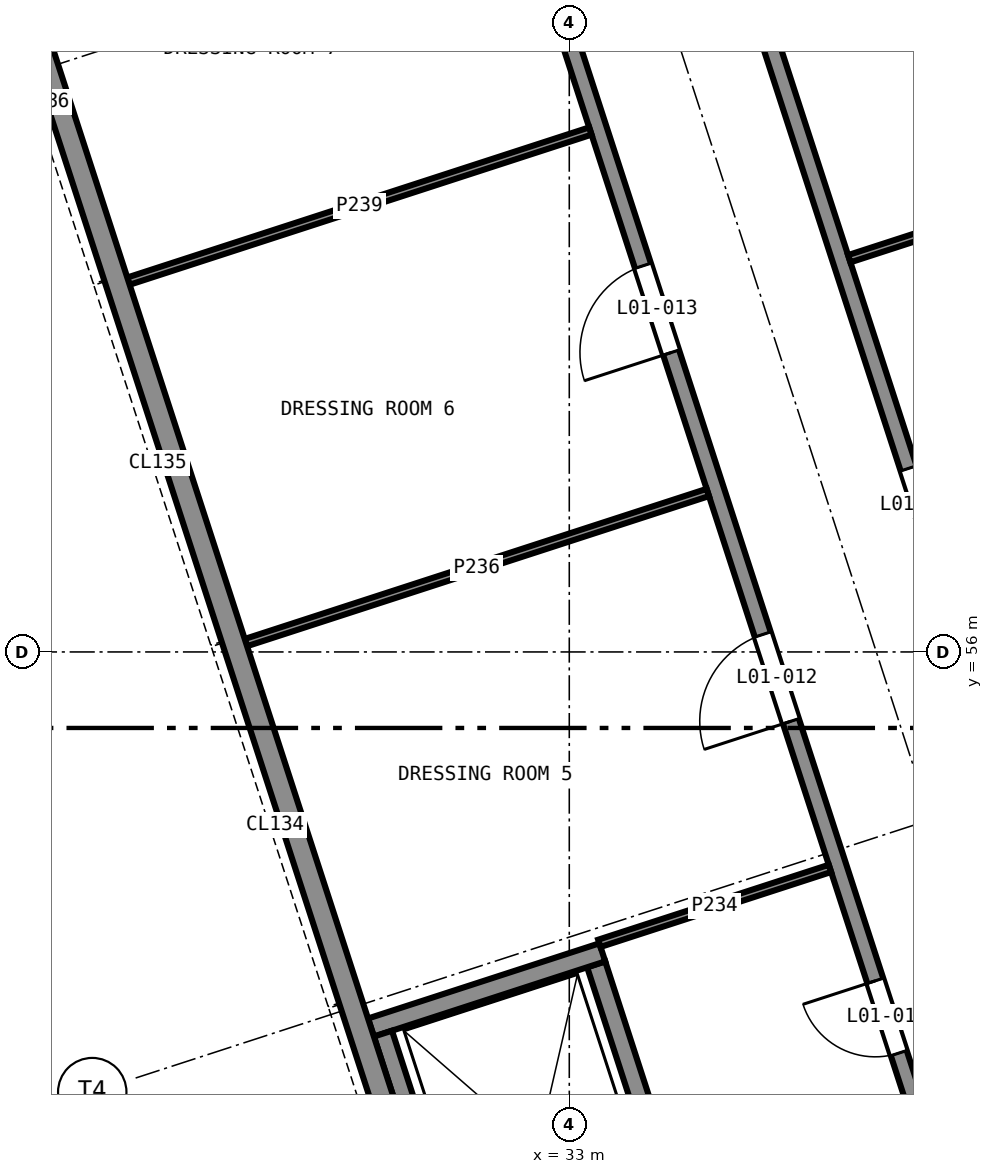
"""IFC4 building model, lengths in metres.
Left out: names, types, materials, properties, quantities, classifications, styles, units other than length and angle.
Written with IfcOpenShell. Run it as: python <this file> out.ifc"""

import sys

from ifc_helpers import new_model, si_unit, direction, frame, frame_2d, origin, place, context, subcontext, project, spatial, rectangle, extrude, element, fill, save


model = new_model("IFC4")
c1 = context("Model", 3, precision=1e-05, world=origin(), true_north=direction((0.0, 1.0)))
c2 = subcontext(c1, "Body", "Model", "MODEL_VIEW")
j1 = project(units=[si_unit("LENGTHUNIT", "METRE"), si_unit("PLANEANGLEUNIT", "RADIAN")], contexts=[c1])
p1 = place(None, origin())
s1 = spatial("IfcSite", under=j1, at=p1, CompositionType="ELEMENT")
p2 = place(p1, origin())
s2 = spatial("IfcBuilding", under=s1, at=p2, CompositionType="ELEMENT")
p3 = place(p2, frame((0.0, 0.0, 5.5)))
s3 = spatial("IfcBuildingStorey", under=s2, at=p3, CompositionType="ELEMENT", Elevation=5.5)
p4 = place(p3, frame((33.501, 41.003, 0.0), z_axis=(0.0, 0.0, 1.0), x_axis=(-0.309017194826, 0.951056451165, 0.0)))
e1 = element("IfcWall", 1, at=p4, inside=s3, PredefinedType="SOLIDWALL", context=c2, shape_type="SweptSolid", body=[
    extrude(rectangle(XDim=53.7, YDim=0.3, at=frame_2d((26.85, 0.0))), origin(), (0.0, 0.0, 1.0), 4.0),
])
p5 = place(p4, frame((26.55, 0.0, 0.9)))
e2 = element("IfcOpeningElement", 2, at=p5, cuts=e1, PredefinedType="OPENING", context=c2, shape_type="SweptSolid", body=[
    extrude(rectangle(XDim=3.6, YDim=2.1, at=frame_2d((1.8, 1.05))), frame((0.0, 0.16, 0.0), z_axis=(0.0, -1.0, 0.0), x_axis=(1.0, 0.0, 0.0)), (0.0, 0.0, 1.0), 0.32),
])
p6 = place(p3, frame((34.621, 47.991, 0.0), z_axis=(0.0, 0.0, 1.0), x_axis=(-0.309055103076, 0.951044133184, 0.0)))
e3 = element("IfcWall", 3, at=p6, inside=s3, PredefinedType="SHEAR", context=c2, shape_type="SweptSolid", body=[
    extrude(rectangle(XDim=4.1, YDim=0.25, at=frame_2d((2.05, 0.0))), origin(), (0.0, 0.0, 1.0), 4.0),
])
p7 = place(p3, frame((33.434, 52.048, 0.0), z_axis=(0.0, 0.0, 1.0), x_axis=(-0.951066581729, -0.308986014439, 0.0)))
e4 = element("IfcWall", 4, at=p7, inside=s3, PredefinedType="SHEAR", context=c2, shape_type="SweptSolid", body=[
    extrude(rectangle(XDim=3.2, YDim=0.25, at=frame_2d((1.6, 0.0))), origin(), (0.0, 0.0, 1.0), 4.0),
])
p8 = place(p3, frame((30.548, 50.979, 0.0), z_axis=(0.0, 0.0, 1.0), x_axis=(0.309055103076, -0.951044133184, 0.0)))
e5 = element("IfcWall", 5, at=p8, inside=s3, PredefinedType="SHEAR", context=c2, shape_type="SweptSolid", body=[
    extrude(rectangle(XDim=4.1, YDim=0.25, at=frame_2d((2.05, 0.0))), origin(), (0.0, 0.0, 1.0), 4.0),
])
p9 = place(p3, frame((37.956, 48.812, 0.0), z_axis=(0.0, 0.0, 1.0), x_axis=(-0.30901736393, 0.951056396219, 0.0)))
e6 = element("IfcWall", 6, at=p9, inside=s3, PredefinedType="SOLIDWALL", context=c2, shape_type="SweptSolid", body=[
    extrude(rectangle(XDim=41.7, YDim=0.22, at=frame_2d((20.85, 0.0))), origin(), (0.0, 0.0, 1.0), 3.7),
])
p10 = place(p9, frame((2.009, 0.0, 0.0)))
e7 = element("IfcOpeningElement", 7, at=p10, cuts=e6, PredefinedType="OPENING", context=c2, shape_type="SweptSolid", body=[
    extrude(rectangle(XDim=1.0, YDim=2.1, at=frame_2d((0.5, 1.05))), frame((0.0, 0.12, 0.0), z_axis=(0.0, -1.0, 0.0), x_axis=(1.0, 0.0, 0.0)), (0.0, 0.0, 1.0), 0.24),
])
p11 = place(p9, frame((6.6, 0.0, 0.0)))
e8 = element("IfcOpeningElement", 8, at=p11, cuts=e6, PredefinedType="OPENING", context=c2, shape_type="SweptSolid", body=[
    extrude(rectangle(XDim=1.2, YDim=2.1, at=frame_2d((0.6, 1.05))), frame((0.0, 0.12, 0.0), z_axis=(0.0, -1.0, 0.0), x_axis=(1.0, 0.0, 0.0)), (0.0, 0.0, 1.0), 0.24),
])
p12 = place(p9, frame((11.7, 0.0, 0.0)))
e9 = element("IfcOpeningElement", 9, at=p12, cuts=e6, PredefinedType="OPENING", context=c2, shape_type="SweptSolid", body=[
    extrude(rectangle(XDim=1.2, YDim=2.1, at=frame_2d((0.6, 1.05))), frame((0.0, 0.12, 0.0), z_axis=(0.0, -1.0, 0.0), x_axis=(1.0, 0.0, 0.0)), (0.0, 0.0, 1.0), 0.24),
])
p13 = place(p9, frame((16.7, 0.0, 0.0)))
e10 = element("IfcOpeningElement", 10, at=p13, cuts=e6, PredefinedType="OPENING", context=c2, shape_type="SweptSolid", body=[
    extrude(rectangle(XDim=1.2, YDim=2.1, at=frame_2d((0.6, 1.05))), frame((0.0, 0.12, 0.0), z_axis=(0.0, -1.0, 0.0), x_axis=(1.0, 0.0, 0.0)), (0.0, 0.0, 1.0), 0.24),
])
p14 = place(p9, frame((21.7, 0.0, 0.0)))
e11 = element("IfcOpeningElement", 11, at=p14, cuts=e6, PredefinedType="OPENING", context=c2, shape_type="SweptSolid", body=[
    extrude(rectangle(XDim=1.2, YDim=2.1, at=frame_2d((0.6, 1.05))), frame((0.0, 0.12, 0.0), z_axis=(0.0, -1.0, 0.0), x_axis=(1.0, 0.0, 0.0)), (0.0, 0.0, 1.0), 0.24),
])
p15 = place(p9, frame((26.7, 0.0, 0.0)))
e12 = element("IfcOpeningElement", 12, at=p15, cuts=e6, PredefinedType="OPENING", context=c2, shape_type="SweptSolid", body=[
    extrude(rectangle(XDim=1.2, YDim=2.1, at=frame_2d((0.6, 1.05))), frame((0.0, 0.12, 0.0), z_axis=(0.0, -1.0, 0.0), x_axis=(1.0, 0.0, 0.0)), (0.0, 0.0, 1.0), 0.24),
])
p16 = place(p9, frame((31.739, 0.0, 0.0)))
e13 = element("IfcOpeningElement", 13, at=p16, cuts=e6, PredefinedType="OPENING", context=c2, shape_type="SweptSolid", body=[
    extrude(rectangle(XDim=1.2, YDim=2.1, at=frame_2d((0.6, 1.05))), frame((0.0, 0.12, 0.0), z_axis=(0.0, -1.0, 0.0), x_axis=(1.0, 0.0, 0.0)), (0.0, 0.0, 1.0), 0.24),
])
p17 = place(p3, frame((40.333, 49.584, 0.0), z_axis=(0.0, 0.0, 1.0), x_axis=(-0.309015643281, 0.951056955291, 0.0)))
e14 = element("IfcWall", 14, at=p17, inside=s3, PredefinedType="SOLIDWALL", context=c2, shape_type="SweptSolid", body=[
    extrude(rectangle(XDim=41.7, YDim=0.22, at=frame_2d((20.85, 0.0))), origin(), (0.0, 0.0, 1.0), 3.7),
])
p18 = place(p17, frame((1.9, 0.0, 0.0)))
e15 = element("IfcOpeningElement", 15, at=p18, cuts=e14, PredefinedType="OPENING", context=c2, shape_type="SweptSolid", body=[
    extrude(rectangle(XDim=1.2, YDim=2.1, at=frame_2d((0.6, 1.05))), frame((0.0, 0.12, 0.0), z_axis=(0.0, -1.0, 0.0), x_axis=(1.0, 0.0, 0.0)), (0.0, 0.0, 1.0), 0.24),
])
p19 = place(p17, frame((8.285, 0.0, 0.0)))
e16 = element("IfcOpeningElement", 16, at=p19, cuts=e14, PredefinedType="OPENING", context=c2, shape_type="SweptSolid", body=[
    extrude(rectangle(XDim=1.0, YDim=2.1, at=frame_2d((0.5, 1.05))), frame((0.0, 0.12, 0.0), z_axis=(0.0, -1.0, 0.0), x_axis=(1.0, 0.0, 0.0)), (0.0, 0.0, 1.0), 0.24),
])
p20 = place(p17, frame((16.375, 0.0, 0.0)))
e17 = element("IfcOpeningElement", 17, at=p20, cuts=e14, PredefinedType="OPENING", context=c2, shape_type="SweptSolid", body=[
    extrude(rectangle(XDim=1.2, YDim=2.1, at=frame_2d((0.6, 1.05))), frame((0.0, 0.12, 0.0), z_axis=(0.0, -1.0, 0.0), x_axis=(1.0, 0.0, 0.0)), (0.0, 0.0, 1.0), 0.24),
])
p21 = place(p17, frame((25.752, 0.0, 0.0)))
e18 = element("IfcOpeningElement", 18, at=p21, cuts=e14, PredefinedType="OPENING", context=c2, shape_type="SweptSolid", body=[
    extrude(rectangle(XDim=1.0, YDim=2.1, at=frame_2d((0.5, 1.05))), frame((0.0, 0.12, 0.0), z_axis=(0.0, -1.0, 0.0), x_axis=(1.0, 0.0, 0.0)), (0.0, 0.0, 1.0), 0.24),
])
p22 = place(p17, frame((32.761, 0.0, 0.0)))
e19 = element("IfcOpeningElement", 19, at=p22, cuts=e14, PredefinedType="OPENING", context=c2, shape_type="SweptSolid", body=[
    extrude(rectangle(XDim=1.0, YDim=2.1, at=frame_2d((0.5, 1.05))), frame((0.0, 0.12, 0.0), z_axis=(0.0, -1.0, 0.0), x_axis=(1.0, 0.0, 0.0)), (0.0, 0.0, 1.0), 0.24),
])
p23 = place(p3, frame((33.396, 52.167, 0.0), z_axis=(0.0, 0.0, 1.0), x_axis=(0.951044192343, 0.309054921027, 0.0)))
e20 = element("IfcWall", 20, at=p23, inside=s3, PredefinedType="PARTITIONING", context=c2, shape_type="SweptSolid", body=[
    extrude(rectangle(XDim=3.19, YDim=0.1, at=frame_2d((1.595, 0.0))), origin(), (0.0, 0.0, 1.0), 3.7),
])
p24 = place(p3, frame((28.745, 56.123, 0.0), z_axis=(0.0, 0.0, 1.0), x_axis=(0.951059053869, 0.309009184417, 0.0)))
e21 = element("IfcWall", 21, at=p24, inside=s3, PredefinedType="PARTITIONING", context=c2, shape_type="SweptSolid", body=[
    extrude(rectangle(XDim=6.39, YDim=0.1, at=frame_2d((3.195, 0.0))), origin(), (0.0, 0.0, 1.0), 3.7),
])
p25 = place(p3, frame((36.683, 61.173, 0.0), z_axis=(0.0, 0.0, 1.0), x_axis=(0.95105616864, 0.309018064344, 0.0)))
e22 = element("IfcWall", 22, at=p25, inside=s3, PredefinedType="PARTITIONING", context=c2, shape_type="SweptSolid", body=[
    extrude(rectangle(XDim=4.14, YDim=0.1, at=frame_2d((2.07, 0.0))), origin(), (0.0, 0.0, 1.0), 3.7),
])
p26 = place(p3, frame((27.2, 60.878, 0.0), z_axis=(0.0, 0.0, 1.0), x_axis=(0.951055405517, 0.309020412977, 0.0)))
e23 = element("IfcWall", 23, at=p26, inside=s3, PredefinedType="PARTITIONING", context=c2, shape_type="SweptSolid", body=[
    extrude(rectangle(XDim=6.39, YDim=0.1, at=frame_2d((3.195, 0.0))), origin(), (0.0, 0.0, 1.0), 3.7),
])
p27 = place(p10, origin())
e24 = element("IfcDoor", 24, at=p27, inside=s3, OperationType="SINGLE_SWING_LEFT", PredefinedType="DOOR", context=c2, shape_type="SweptSolid", body=[
    extrude(rectangle(XDim=1.0, YDim=2.1, at=frame_2d((0.5, 1.05))), frame((0.0, 0.025, 0.0), z_axis=(0.0, -1.0, 0.0), x_axis=(1.0, 0.0, 0.0)), (0.0, 0.0, 1.0), 0.05),
])
fill(e7, e24)
p28 = place(p11, origin())
e25 = element("IfcDoor", 25, at=p28, inside=s3, OperationType="SINGLE_SWING_RIGHT", PredefinedType="DOOR", context=c2, shape_type="SweptSolid", body=[
    extrude(rectangle(XDim=1.2, YDim=2.1, at=frame_2d((0.6, 1.05))), frame((0.0, 0.025, 0.0), z_axis=(0.0, -1.0, 0.0), x_axis=(1.0, 0.0, 0.0)), (0.0, 0.0, 1.0), 0.05),
])
fill(e8, e25)
p29 = place(p12, origin())
e26 = element("IfcDoor", 26, at=p29, inside=s3, OperationType="SINGLE_SWING_RIGHT", PredefinedType="DOOR", context=c2, shape_type="SweptSolid", body=[
    extrude(rectangle(XDim=1.2, YDim=2.1, at=frame_2d((0.6, 1.05))), frame((0.0, 0.025, 0.0), z_axis=(0.0, -1.0, 0.0), x_axis=(1.0, 0.0, 0.0)), (0.0, 0.0, 1.0), 0.05),
])
fill(e9, e26)
p30 = place(p19, frame((1.0, 0.0, 0.0), z_axis=(0.0, 0.0, 1.0), x_axis=(-1.0, 0.0, 0.0)))
e27 = element("IfcDoor", 27, at=p30, inside=s3, OperationType="SINGLE_SWING_LEFT", PredefinedType="DOOR", context=c2, shape_type="SweptSolid", body=[
    extrude(rectangle(XDim=1.0, YDim=2.1, at=frame_2d((0.5, 1.05))), frame((0.0, 0.025, 0.0), z_axis=(0.0, -1.0, 0.0), x_axis=(1.0, 0.0, 0.0)), (0.0, 0.0, 1.0), 0.05),
])
fill(e16, e27)
save(model, sys.argv[1])
